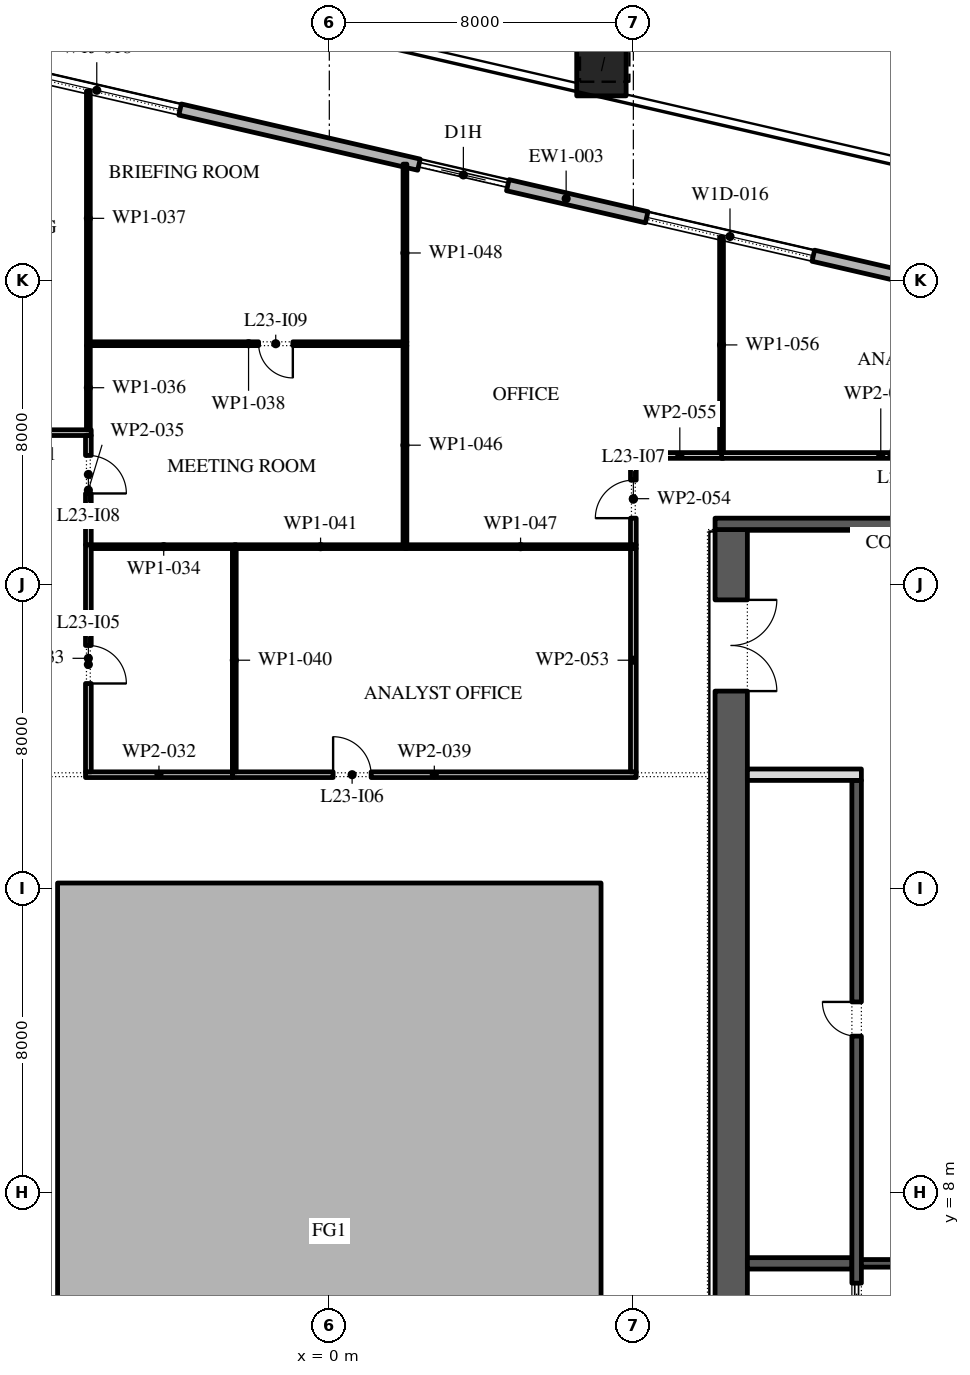
"""IFC4 building model, lengths in metres.
Left out: names, types, materials, properties, quantities, classifications, styles, units other than length and angle.
Written with IfcOpenShell. Run it as: python <this file> out.ifc"""

import sys

from ifc_helpers import new_model, si_unit, direction, frame, frame_2d, origin, origin_2d, place, context, subcontext, project, spatial, polyline, rectangle, outline, extrude, element, fill, save


model = new_model("IFC4")
c1 = context("Model", 3, precision=1e-05, world=origin(), true_north=direction((0.0, 1.0)))
c2 = subcontext(c1, "Body", "Model", "MODEL_VIEW")
j1 = project(units=[si_unit("LENGTHUNIT", "METRE"), si_unit("PLANEANGLEUNIT", "RADIAN")], contexts=[c1])
p1 = place(None, origin())
s1 = spatial("IfcSite", under=j1, at=p1, CompositionType="ELEMENT")
p2 = place(p1, origin())
s2 = spatial("IfcBuilding", under=s1, at=p2, CompositionType="ELEMENT")
p3 = place(p2, frame((0.0, 0.0, 109.8)))
s3 = spatial("IfcBuildingStorey", under=s2, at=p3, CompositionType="ELEMENT", Elevation=109.8)
p4 = place(p3, frame((7.16, 37.511, 0.0), z_axis=(0.020377493232, 0.0882252832, 0.995892091129), x_axis=(-0.97434807649, 0.225046274885, 0.0)))
e1 = element("IfcColumn", 1, at=p4, inside=s3, PredefinedType="COLUMN", context=c2, shape_type="SweptSolid", body=[
    extrude(rectangle(XDim=1.3, YDim=1.3, at=origin_2d()), origin(), (0.0, 0.0, 1.0), 4.217),
])
p5 = place(p3, origin())
e2 = element("IfcWall", 2, at=p5, inside=s3, PredefinedType="STANDARD", context=c2, shape_type="SweptSolid", body=[
    extrude(outline(polyline([(-7.15, -2.15), (7.15, -2.15), (7.15, 16.15), (-7.15, 16.15), (-7.15, -2.15)]), holes=[polyline([(-7.0, -2.0), (-7.0, 16.0), (7.0, 16.0), (7.0, -2.0), (-7.0, -2.0)])]), origin(), (0.0, 0.0, 1.0), 4.0),
])
p6 = place(p3, frame((31.078, 28.421, 0.0), z_axis=(0.0, 0.0, 1.0), x_axis=(-0.974370456532, 0.224949357493, 0.0)))
e3 = element("IfcWall", 3, at=p6, inside=s3, PredefinedType="STANDARD", context=c2, shape_type="SweptSolid", body=[
    extrude(rectangle(XDim=51.0, YDim=0.3, at=frame_2d((25.5, 0.0))), origin(), (0.0, 0.0, 1.0), 4.0),
])
p7 = place(p6, frame((1.875, 0.0, 0.45)))
e4 = element("IfcOpeningElement", 4, at=p7, cuts=e3, PredefinedType="OPENING", context=c2, shape_type="SweptSolid", body=[
    extrude(rectangle(XDim=4.5, YDim=3.05, at=frame_2d((2.25, 1.525))), frame((0.0, 0.16, 0.0), z_axis=(0.0, -1.0, 0.0), x_axis=(1.0, 0.0, 0.0)), (0.0, 0.0, 1.0), 0.32),
])
p8 = place(p6, frame((10.275, 0.0, 0.45)))
e5 = element("IfcOpeningElement", 5, at=p8, cuts=e3, PredefinedType="OPENING", context=c2, shape_type="SweptSolid", body=[
    extrude(rectangle(XDim=4.5, YDim=2.875, at=frame_2d((2.25, 1.438))), frame((0.0, 0.16, 0.0), z_axis=(0.0, -1.0, 0.0), x_axis=(1.0, 0.0, 0.0)), (0.0, 0.0, 1.0), 0.32),
])
p9 = place(p6, frame((18.825, 0.0, 0.45)))
e6 = element("IfcOpeningElement", 6, at=p9, cuts=e3, PredefinedType="OPENING", context=c2, shape_type="SweptSolid", body=[
    extrude(rectangle(XDim=4.5, YDim=2.875, at=frame_2d((2.25, 1.438))), frame((0.0, 0.16, 0.0), z_axis=(0.0, -1.0, 0.0), x_axis=(1.0, 0.0, 0.0)), (0.0, 0.0, 1.0), 0.32),
])
p10 = place(p6, frame((27.075, 0.0, 0.0)))
e7 = element("IfcOpeningElement", 7, at=p10, cuts=e3, PredefinedType="OPENING", context=c2, shape_type="SweptSolid", body=[
    extrude(rectangle(XDim=2.4, YDim=3.2, at=frame_2d((1.2, 1.6))), frame((0.0, 0.16, 0.0), z_axis=(0.0, -1.0, 0.0), x_axis=(1.0, 0.0, 0.0)), (0.0, 0.0, 1.0), 0.32),
])
p11 = place(p6, frame((35.925, 0.0, 0.45)))
e8 = element("IfcOpeningElement", 8, at=p11, cuts=e3, PredefinedType="OPENING", context=c2, shape_type="SweptSolid", body=[
    extrude(rectangle(XDim=4.5, YDim=2.675, at=frame_2d((2.25, 1.337))), frame((0.0, 0.16, 0.0), z_axis=(0.0, -1.0, 0.0), x_axis=(1.0, 0.0, 0.0)), (0.0, 0.0, 1.0), 0.32),
])
p12 = place(p6, frame((44.475, 0.0, 0.45)))
e9 = element("IfcOpeningElement", 9, at=p12, cuts=e3, PredefinedType="OPENING", context=c2, shape_type="SweptSolid", body=[
    extrude(rectangle(XDim=4.5, YDim=3.05, at=frame_2d((2.25, 1.525))), frame((0.0, 0.16, 0.0), z_axis=(0.0, -1.0, 0.0), x_axis=(1.0, 0.0, 0.0)), (0.0, 0.0, 1.0), 0.32),
])
p13 = place(p3, frame((10.575, -2.45, 0.0), z_axis=(0.0, 0.0, 1.0), x_axis=(0.0, 1.0, 0.0)))
e10 = element("IfcWall", 10, at=p13, inside=s3, PredefinedType="SHEAR", context=c2, shape_type="SweptSolid", body=[
    extrude(rectangle(XDim=27.9, YDim=0.85, at=frame_2d((13.95, 0.0))), origin(), (0.0, 0.0, 1.0), 4.0),
])
p14 = place(p13, frame((23.65, 0.0, 0.0)))
e11 = element("IfcOpeningElement", 11, at=p14, cuts=e10, PredefinedType="OPENING", context=c2, shape_type="SweptSolid", body=[
    extrude(rectangle(XDim=2.4, YDim=2.1, at=frame_2d((1.2, 1.05))), frame((0.0, 0.435, 0.0), z_axis=(0.0, -1.0, 0.0), x_axis=(1.0, 0.0, 0.0)), (0.0, 0.0, 1.0), 0.87),
])
p15 = place(p13, frame((1.087, 0.0, 0.0)))
e12 = element("IfcOpeningElement", 12, at=p15, cuts=e10, PredefinedType="OPENING", context=c2, shape_type="SweptSolid", body=[
    extrude(rectangle(XDim=0.9, YDim=2.1, at=frame_2d((0.45, 1.05))), frame((0.0, 0.435, 0.0), z_axis=(0.0, -1.0, 0.0), x_axis=(1.0, 0.0, 0.0)), (0.0, 0.0, 1.0), 0.87),
])
p16 = place(p13, frame((4.262, 0.0, 0.0)))
e13 = element("IfcOpeningElement", 13, at=p16, cuts=e10, PredefinedType="OPENING", context=c2, shape_type="SweptSolid", body=[
    extrude(rectangle(XDim=1.0, YDim=2.1, at=frame_2d((0.5, 1.05))), frame((0.0, 0.435, 0.0), z_axis=(0.0, -1.0, 0.0), x_axis=(1.0, 0.0, 0.0)), (0.0, 0.0, 1.0), 0.87),
])
p17 = place(p3, frame((10.15, 25.6, 0.0), z_axis=(0.0, 0.0, 1.0), x_axis=(1.0, 0.0, 0.0)))
e14 = element("IfcWall", 14, at=p17, inside=s3, PredefinedType="SHEAR", context=c2, shape_type="SweptSolid", body=[
    extrude(rectangle(XDim=11.7, YDim=0.3, at=frame_2d((5.85, 0.0))), origin(), (0.0, 0.0, 1.0), 4.0),
])
p18 = place(p3, frame((11.0, 6.143, 0.0), z_axis=(0.0, 0.0, 1.0), x_axis=(1.0, 0.0, 0.0)))
e15 = element("IfcWall", 15, at=p18, inside=s3, PredefinedType="SHEAR", context=c2, shape_type="SweptSolid", body=[
    extrude(rectangle(XDim=2.75, YDim=0.3, at=frame_2d((1.375, 0.0))), origin(), (0.0, 0.0, 1.0), 4.0),
])
p19 = place(p3, frame((13.875, -2.45, 0.0), z_axis=(0.0, 0.0, 1.0), x_axis=(0.0, 1.0, 0.0)))
e16 = element("IfcWall", 16, at=p19, inside=s3, PredefinedType="SHEAR", context=c2, shape_type="SweptSolid", body=[
    extrude(rectangle(XDim=21.3, YDim=0.25, at=frame_2d((10.65, 0.0))), origin(), (0.0, 0.0, 1.0), 4.0),
])
p20 = place(p19, frame((14.571, 0.0, 0.0)))
e17 = element("IfcOpeningElement", 17, at=p20, cuts=e16, PredefinedType="OPENING", context=c2, shape_type="SweptSolid", body=[
    extrude(rectangle(XDim=0.9, YDim=2.1, at=frame_2d((0.45, 1.05))), frame((0.0, 0.135, 0.0), z_axis=(0.0, -1.0, 0.0), x_axis=(1.0, 0.0, 0.0)), (0.0, 0.0, 1.0), 0.27),
])
p21 = place(p19, frame((6.971, 0.0, 0.0)))
e18 = element("IfcOpeningElement", 18, at=p21, cuts=e16, PredefinedType="OPENING", context=c2, shape_type="SweptSolid", body=[
    extrude(rectangle(XDim=1.1, YDim=2.1, at=frame_2d((0.55, 1.05))), frame((0.0, 0.135, 0.0), z_axis=(0.0, -1.0, 0.0), x_axis=(1.0, 0.0, 0.0)), (0.0, 0.0, 1.0), 0.27),
])
p22 = place(p3, frame((11.0, 19.0, 0.0), z_axis=(0.0, 0.0, 1.0), x_axis=(1.0, 0.0, 0.0)))
e19 = element("IfcWall", 19, at=p22, inside=s3, PredefinedType="PARTITIONING", context=c2, shape_type="SweptSolid", body=[
    extrude(rectangle(XDim=3.0, YDim=0.3, at=frame_2d((1.5, 0.0))), origin(), (0.0, 0.0, 1.0), 4.0),
])
p23 = place(p3, frame((14.0, 6.143, 0.0), z_axis=(0.0, 0.0, 1.0), x_axis=(1.0, 0.0, 0.0)))
e20 = element("IfcWall", 20, at=p23, inside=s3, PredefinedType="SHEAR", context=c2, shape_type="SweptSolid", body=[
    extrude(rectangle(XDim=4.0, YDim=0.2, at=frame_2d((2.0, 0.0))), origin(), (0.0, 0.0, 1.0), 4.0),
])
p24 = place(p23, frame((1.4, 0.0, 0.0)))
e21 = element("IfcOpeningElement", 21, at=p24, cuts=e20, PredefinedType="OPENING", context=c2, shape_type="SweptSolid", body=[
    extrude(rectangle(XDim=1.2, YDim=2.1, at=frame_2d((0.6, 1.05))), frame((0.0, 0.11, 0.0), z_axis=(0.0, -1.0, 0.0), x_axis=(1.0, 0.0, 0.0)), (0.0, 0.0, 1.0), 0.22),
])
p25 = place(p3, frame((-10.27, 28.0, 0.0), z_axis=(0.0, 0.0, 1.0), x_axis=(1.0, 0.0, 0.0)))
e22 = element("IfcWall", 22, at=p25, inside=s3, PredefinedType="PARTITIONING", context=c2, shape_type="SweptSolid", body=[
    extrude(rectangle(XDim=4.005, YDim=0.15, at=frame_2d((2.002, 0.0))), origin(), (0.0, 0.0, 1.0), 4.0),
])
p26 = place(p25, frame((1.78, 0.0, 0.0)))
e23 = element("IfcOpeningElement", 23, at=p26, cuts=e22, PredefinedType="OPENING", context=c2, shape_type="SweptSolid", body=[
    extrude(rectangle(XDim=1.0, YDim=2.1, at=frame_2d((0.5, 1.05))), frame((0.0, 0.085, 0.0), z_axis=(0.0, -1.0, 0.0), x_axis=(1.0, 0.0, 0.0)), (0.0, 0.0, 1.0), 0.17),
])
p27 = place(p3, frame((-6.415, 19.0, 0.0), z_axis=(0.0, 0.0, 1.0), x_axis=(1.0, 0.0, 0.0)))
e24 = element("IfcWall", 24, at=p27, inside=s3, PredefinedType="PARTITIONING", context=c2, shape_type="SweptSolid", body=[
    extrude(rectangle(XDim=3.865, YDim=0.15, at=frame_2d((1.933, 0.0))), origin(), (0.0, 0.0, 1.0), 4.0),
])
p28 = place(p3, frame((-6.34, 25.05, 0.0), z_axis=(0.0, 0.0, 1.0), x_axis=(0.0, -1.0, 0.0)))
e25 = element("IfcWall", 25, at=p28, inside=s3, PredefinedType="PARTITIONING", context=c2, shape_type="SweptSolid", body=[
    extrude(rectangle(XDim=5.975, YDim=0.15, at=frame_2d((2.988, 0.0))), origin(), (0.0, 0.0, 1.0), 4.0),
])
p29 = place(p28, frame((2.65, 0.0, 0.0)))
e26 = element("IfcOpeningElement", 26, at=p29, cuts=e25, PredefinedType="OPENING", context=c2, shape_type="SweptSolid", body=[
    extrude(rectangle(XDim=1.0, YDim=2.1, at=frame_2d((0.5, 1.05))), frame((0.0, 0.085, 0.0), z_axis=(0.0, -1.0, 0.0), x_axis=(1.0, 0.0, 0.0)), (0.0, 0.0, 1.0), 0.17),
])
p30 = place(p3, frame((-6.265, 25.0, 0.0), z_axis=(0.0, 0.0, 1.0), x_axis=(1.0, 0.0, 0.0)))
e27 = element("IfcWall", 27, at=p30, inside=s3, PredefinedType="PARTITIONING", context=c2, shape_type="SweptSolid", body=[
    extrude(rectangle(XDim=3.815, YDim=0.1, at=frame_2d((1.907, 0.0))), origin(), (0.0, 0.0, 1.0), 4.0),
])
p31 = place(p3, frame((-6.34, 27.925, 0.0), z_axis=(0.0, 0.0, 1.0), x_axis=(0.0, -1.0, 0.0)))
e28 = element("IfcWall", 28, at=p31, inside=s3, PredefinedType="PARTITIONING", context=c2, shape_type="SweptSolid", body=[
    extrude(rectangle(XDim=2.875, YDim=0.15, at=frame_2d((1.438, 0.0))), origin(), (0.0, 0.0, 1.0), 4.0),
])
p32 = place(p31, frame((0.525, 0.0, 0.0)))
e29 = element("IfcOpeningElement", 29, at=p32, cuts=e28, PredefinedType="OPENING", context=c2, shape_type="SweptSolid", body=[
    extrude(rectangle(XDim=1.0, YDim=2.1, at=frame_2d((0.5, 1.05))), frame((0.0, 0.085, 0.0), z_axis=(0.0, -1.0, 0.0), x_axis=(1.0, 0.0, 0.0)), (0.0, 0.0, 1.0), 0.17),
])
p33 = place(p3, frame((-6.34, 28.075, 0.0), z_axis=(0.0, 0.0, 1.0), x_axis=(0.0, 1.0, 0.0)))
e30 = element("IfcWall", 30, at=p33, inside=s3, PredefinedType="PARTITIONING", context=c2, shape_type="SweptSolid", body=[
    extrude(rectangle(XDim=2.215, YDim=0.1, at=frame_2d((1.107, 0.0))), origin(), (0.0, 0.0, 1.0), 4.0),
])
p34 = place(p3, frame((-6.34, 30.29, 0.0), z_axis=(0.0, 0.0, 1.0), x_axis=(0.0, 1.0, 0.0)))
e31 = element("IfcWall", 31, at=p34, inside=s3, PredefinedType="PARTITIONING", context=c2, shape_type="SweptSolid", body=[
    extrude(rectangle(XDim=6.698, YDim=0.1, at=frame_2d((3.349, 0.0))), origin(), (0.0, 0.0, 1.0), 4.0),
])
p35 = place(p3, frame((-6.29, 30.34, 0.0), z_axis=(0.0, 0.0, 1.0), x_axis=(1.0, 0.0, 0.0)))
e32 = element("IfcWall", 32, at=p35, inside=s3, PredefinedType="PARTITIONING", context=c2, shape_type="SweptSolid", body=[
    extrude(rectangle(XDim=8.33, YDim=0.1, at=frame_2d((4.165, 0.0))), origin(), (0.0, 0.0, 1.0), 4.0),
])
p36 = place(p35, frame((4.43, 0.0, 0.0)))
e33 = element("IfcOpeningElement", 33, at=p36, cuts=e32, PredefinedType="OPENING", context=c2, shape_type="SweptSolid", body=[
    extrude(rectangle(XDim=0.9, YDim=2.1, at=frame_2d((0.45, 1.05))), frame((0.0, 0.06, 0.0), z_axis=(0.0, -1.0, 0.0), x_axis=(1.0, 0.0, 0.0)), (0.0, 0.0, 1.0), 0.12),
])
p37 = place(p3, frame((-2.55, 19.0, 0.0), z_axis=(0.0, 0.0, 1.0), x_axis=(1.0, 0.0, 0.0)))
e34 = element("IfcWall", 34, at=p37, inside=s3, PredefinedType="PARTITIONING", context=c2, shape_type="SweptSolid", body=[
    extrude(rectangle(XDim=10.625, YDim=0.15, at=frame_2d((5.312, 0.0))), origin(), (0.0, 0.0, 1.0), 4.0),
])
p38 = place(p37, frame((2.65, 0.0, 0.0)))
e35 = element("IfcOpeningElement", 35, at=p38, cuts=e34, PredefinedType="OPENING", context=c2, shape_type="SweptSolid", body=[
    extrude(rectangle(XDim=1.0, YDim=2.1, at=frame_2d((0.5, 1.05))), frame((0.0, 0.085, 0.0), z_axis=(0.0, -1.0, 0.0), x_axis=(1.0, 0.0, 0.0)), (0.0, 0.0, 1.0), 0.17),
])
p39 = place(p3, frame((-2.5, 24.95, 0.0), z_axis=(0.0, 0.0, 1.0), x_axis=(0.0, -1.0, 0.0)))
e36 = element("IfcWall", 36, at=p39, inside=s3, PredefinedType="PARTITIONING", context=c2, shape_type="SweptSolid", body=[
    extrude(rectangle(XDim=5.875, YDim=0.1, at=frame_2d((2.938, 0.0))), origin(), (0.0, 0.0, 1.0), 4.0),
])
p40 = place(p3, frame((-2.5, 25.0, 0.0), z_axis=(0.0, 0.0, 1.0), x_axis=(1.0, 0.0, 0.0)))
e37 = element("IfcWall", 37, at=p40, inside=s3, PredefinedType="PARTITIONING", context=c2, shape_type="SweptSolid", body=[
    extrude(rectangle(XDim=4.54, YDim=0.1, at=frame_2d((2.27, 0.0))), origin(), (0.0, 0.0, 1.0), 4.0),
])
p41 = place(p3, frame((1.99, 25.05, 0.0), z_axis=(0.0, 0.0, 1.0), x_axis=(0.0, 1.0, 0.0)))
e38 = element("IfcWall", 38, at=p41, inside=s3, PredefinedType="PARTITIONING", context=c2, shape_type="SweptSolid", body=[
    extrude(rectangle(XDim=5.24, YDim=0.1, at=frame_2d((2.62, 0.0))), origin(), (0.0, 0.0, 1.0), 4.0),
])
p42 = place(p3, frame((1.99, 25.0, 0.0), z_axis=(0.0, 0.0, 1.0), x_axis=(1.0, 0.0, 0.0)))
e39 = element("IfcWall", 39, at=p42, inside=s3, PredefinedType="PARTITIONING", context=c2, shape_type="SweptSolid", body=[
    extrude(rectangle(XDim=6.085, YDim=0.1, at=frame_2d((3.042, 0.0))), origin(), (0.0, 0.0, 1.0), 4.0),
])
p43 = place(p3, frame((1.99, 30.39, 0.0), z_axis=(0.0, 0.0, 1.0), x_axis=(0.0, 1.0, 0.0)))
e40 = element("IfcWall", 40, at=p43, inside=s3, PredefinedType="PARTITIONING", context=c2, shape_type="SweptSolid", body=[
    extrude(rectangle(XDim=4.675, YDim=0.1, at=frame_2d((2.337, 0.0))), origin(), (0.0, 0.0, 1.0), 4.0),
])
p44 = place(p3, frame((8.0, 19.075, 0.0), z_axis=(0.0, 0.0, 1.0), x_axis=(0.0, 1.0, 0.0)))
e41 = element("IfcWall", 41, at=p44, inside=s3, PredefinedType="PARTITIONING", context=c2, shape_type="SweptSolid", body=[
    extrude(rectangle(XDim=5.875, YDim=0.15, at=frame_2d((2.938, 0.0))), origin(), (0.0, 0.0, 1.0), 4.0),
])
p45 = place(p3, frame((8.0, 25.05, 0.0), z_axis=(0.0, 0.0, 1.0), x_axis=(0.0, 1.0, 0.0)))
e42 = element("IfcWall", 42, at=p45, inside=s3, PredefinedType="PARTITIONING", context=c2, shape_type="SweptSolid", body=[
    extrude(rectangle(XDim=2.425, YDim=0.15, at=frame_2d((1.212, 0.0))), origin(), (0.0, 0.0, 1.0), 4.0),
])
p46 = place(p45, frame((0.7, 0.0, 0.0)))
e43 = element("IfcOpeningElement", 43, at=p46, cuts=e42, PredefinedType="OPENING", context=c2, shape_type="SweptSolid", body=[
    extrude(rectangle(XDim=1.0, YDim=2.1, at=frame_2d((0.5, 1.05))), frame((0.0, 0.085, 0.0), z_axis=(0.0, -1.0, 0.0), x_axis=(1.0, 0.0, 0.0)), (0.0, 0.0, 1.0), 0.17),
])
p47 = place(p3, frame((8.075, 27.4, 0.0), z_axis=(0.0, 0.0, 1.0), x_axis=(1.0, 0.0, 0.0)))
e44 = element("IfcWall", 44, at=p47, inside=s3, PredefinedType="PARTITIONING", context=c2, shape_type="SweptSolid", body=[
    extrude(rectangle(XDim=2.295, YDim=0.15, at=frame_2d((1.147, 0.0))), origin(), (0.0, 0.0, 1.0), 4.0),
])
p48 = place(p3, frame((10.32, 27.475, 0.0), z_axis=(0.0, 0.0, 1.0), x_axis=(0.0, 1.0, 0.0)))
e45 = element("IfcWall", 45, at=p48, inside=s3, PredefinedType="PARTITIONING", context=c2, shape_type="SweptSolid", body=[
    extrude(rectangle(XDim=5.667, YDim=0.1, at=frame_2d((2.833, 0.0))), origin(), (0.0, 0.0, 1.0), 4.0),
])
p49 = place(p3, frame((10.32, 27.4, 0.0), z_axis=(0.0, 0.0, 1.0), x_axis=(1.0, 0.0, 0.0)))
e46 = element("IfcWall", 46, at=p49, inside=s3, PredefinedType="PARTITIONING", context=c2, shape_type="SweptSolid", body=[
    extrude(rectangle(XDim=8.38, YDim=0.15, at=frame_2d((4.19, 0.0))), origin(), (0.0, 0.0, 1.0), 4.0),
])
p50 = place(p49, frame((4.43, 0.0, 0.0)))
e47 = element("IfcOpeningElement", 47, at=p50, cuts=e46, PredefinedType="OPENING", context=c2, shape_type="SweptSolid", body=[
    extrude(rectangle(XDim=1.0, YDim=2.1, at=frame_2d((0.5, 1.05))), frame((0.0, 0.085, 0.0), z_axis=(0.0, -1.0, 0.0), x_axis=(1.0, 0.0, 0.0)), (0.0, 0.0, 1.0), 0.17),
])
p51 = place(p9, origin())
e48 = element("IfcWindow", 48, at=p51, inside=s3, PartitioningType="DOUBLE_PANEL_VERTICAL", PredefinedType="WINDOW", context=c2, shape_type="SweptSolid", body=[
    extrude(rectangle(XDim=4.5, YDim=2.875, at=frame_2d((2.25, 1.438))), frame((0.0, 0.03, 0.0), z_axis=(0.0, -1.0, 0.0), x_axis=(1.0, 0.0, 0.0)), (0.0, 0.0, 1.0), 0.06),
])
fill(e6, e48)
p52 = place(p10, origin())
e49 = element("IfcDoor", 49, at=p52, inside=s3, OperationType="DOUBLE_DOOR_SLIDING", PredefinedType="DOOR", context=c2, shape_type="SweptSolid", body=[
    extrude(rectangle(XDim=2.4, YDim=3.2, at=frame_2d((1.2, 1.6))), frame((0.0, 0.025, 0.0), z_axis=(0.0, -1.0, 0.0), x_axis=(1.0, 0.0, 0.0)), (0.0, 0.0, 1.0), 0.05),
])
fill(e7, e49)
p53 = place(p11, origin())
e50 = element("IfcWindow", 50, at=p53, inside=s3, PartitioningType="DOUBLE_PANEL_VERTICAL", PredefinedType="WINDOW", context=c2, shape_type="SweptSolid", body=[
    extrude(rectangle(XDim=4.5, YDim=2.675, at=frame_2d((2.25, 1.337))), frame((0.0, 0.03, 0.0), z_axis=(0.0, -1.0, 0.0), x_axis=(1.0, 0.0, 0.0)), (0.0, 0.0, 1.0), 0.06),
])
fill(e8, e50)
p54 = place(p20, origin())
e51 = element("IfcDoor", 51, at=p54, inside=s3, OperationType="SINGLE_SWING_LEFT", PredefinedType="DOOR", context=c2, shape_type="SweptSolid", body=[
    extrude(rectangle(XDim=0.9, YDim=2.1, at=frame_2d((0.45, 1.05))), frame((0.0, 0.125, 0.0), z_axis=(0.0, -1.0, 0.0), x_axis=(1.0, 0.0, 0.0)), (0.0, 0.0, 1.0), 0.05),
])
fill(e17, e51)
p55 = place(p21, origin())
e52 = element("IfcDoor", 52, at=p55, inside=s3, OperationType="SLIDING_TO_LEFT", PredefinedType="DOOR", context=c2, shape_type="SweptSolid", body=[
    extrude(rectangle(XDim=1.1, YDim=2.1, at=frame_2d((0.55, 1.05))), frame((0.0, 0.025, 0.0), z_axis=(0.0, -1.0, 0.0), x_axis=(1.0, 0.0, 0.0)), (0.0, 0.0, 1.0), 0.05),
])
fill(e18, e52)
p56 = place(p14, frame((2.4, 0.0, 0.0), z_axis=(0.0, 0.0, 1.0), x_axis=(-1.0, 0.0, 0.0)))
e53 = element("IfcDoor", 53, at=p56, inside=s3, OperationType="DOUBLE_DOOR_SINGLE_SWING", PredefinedType="DOOR", context=c2, shape_type="SweptSolid", body=[
    extrude(rectangle(XDim=2.4, YDim=2.1, at=frame_2d((1.2, 1.05))), frame((0.0, 0.025, 0.0), z_axis=(0.0, -1.0, 0.0), x_axis=(1.0, 0.0, 0.0)), (0.0, 0.0, 1.0), 0.05),
])
fill(e11, e53)
p57 = place(p29, origin())
e54 = element("IfcDoor", 54, at=p57, inside=s3, OperationType="SINGLE_SWING_LEFT", PredefinedType="DOOR", context=c2, shape_type="SweptSolid", body=[
    extrude(rectangle(XDim=1.0, YDim=2.1, at=frame_2d((0.5, 1.05))), frame((0.0, 0.025, 0.0), z_axis=(0.0, -1.0, 0.0), x_axis=(1.0, 0.0, 0.0)), (0.0, 0.0, 1.0), 0.05),
])
fill(e26, e54)
p58 = place(p38, origin())
e55 = element("IfcDoor", 55, at=p58, inside=s3, OperationType="SINGLE_SWING_RIGHT", PredefinedType="DOOR", context=c2, shape_type="SweptSolid", body=[
    extrude(rectangle(XDim=1.0, YDim=2.1, at=frame_2d((0.5, 1.05))), frame((0.0, 0.025, 0.0), z_axis=(0.0, -1.0, 0.0), x_axis=(1.0, 0.0, 0.0)), (0.0, 0.0, 1.0), 0.05),
])
fill(e35, e55)
p59 = place(p46, origin())
e56 = element("IfcDoor", 56, at=p59, inside=s3, OperationType="SINGLE_SWING_RIGHT", PredefinedType="DOOR", context=c2, shape_type="SweptSolid", body=[
    extrude(rectangle(XDim=1.0, YDim=2.1, at=frame_2d((0.5, 1.05))), frame((0.0, 0.025, 0.0), z_axis=(0.0, -1.0, 0.0), x_axis=(1.0, 0.0, 0.0)), (0.0, 0.0, 1.0), 0.05),
])
fill(e43, e56)
p60 = place(p32, origin())
e57 = element("IfcDoor", 57, at=p60, inside=s3, OperationType="SINGLE_SWING_LEFT", PredefinedType="DOOR", context=c2, shape_type="SweptSolid", body=[
    extrude(rectangle(XDim=1.0, YDim=2.1, at=frame_2d((0.5, 1.05))), frame((0.0, 0.025, 0.0), z_axis=(0.0, -1.0, 0.0), x_axis=(1.0, 0.0, 0.0)), (0.0, 0.0, 1.0), 0.05),
])
fill(e29, e57)
p61 = place(p36, frame((0.9, 0.0, 0.0), z_axis=(0.0, 0.0, 1.0), x_axis=(-1.0, 0.0, 0.0)))
e58 = element("IfcDoor", 58, at=p61, inside=s3, OperationType="SINGLE_SWING_RIGHT", PredefinedType="DOOR", context=c2, shape_type="SweptSolid", body=[
    extrude(rectangle(XDim=0.9, YDim=2.1, at=frame_2d((0.45, 1.05))), frame((0.0, 0.025, 0.0), z_axis=(0.0, -1.0, 0.0), x_axis=(1.0, 0.0, 0.0)), (0.0, 0.0, 1.0), 0.05),
])
fill(e33, e58)
save(model, sys.argv[1])
